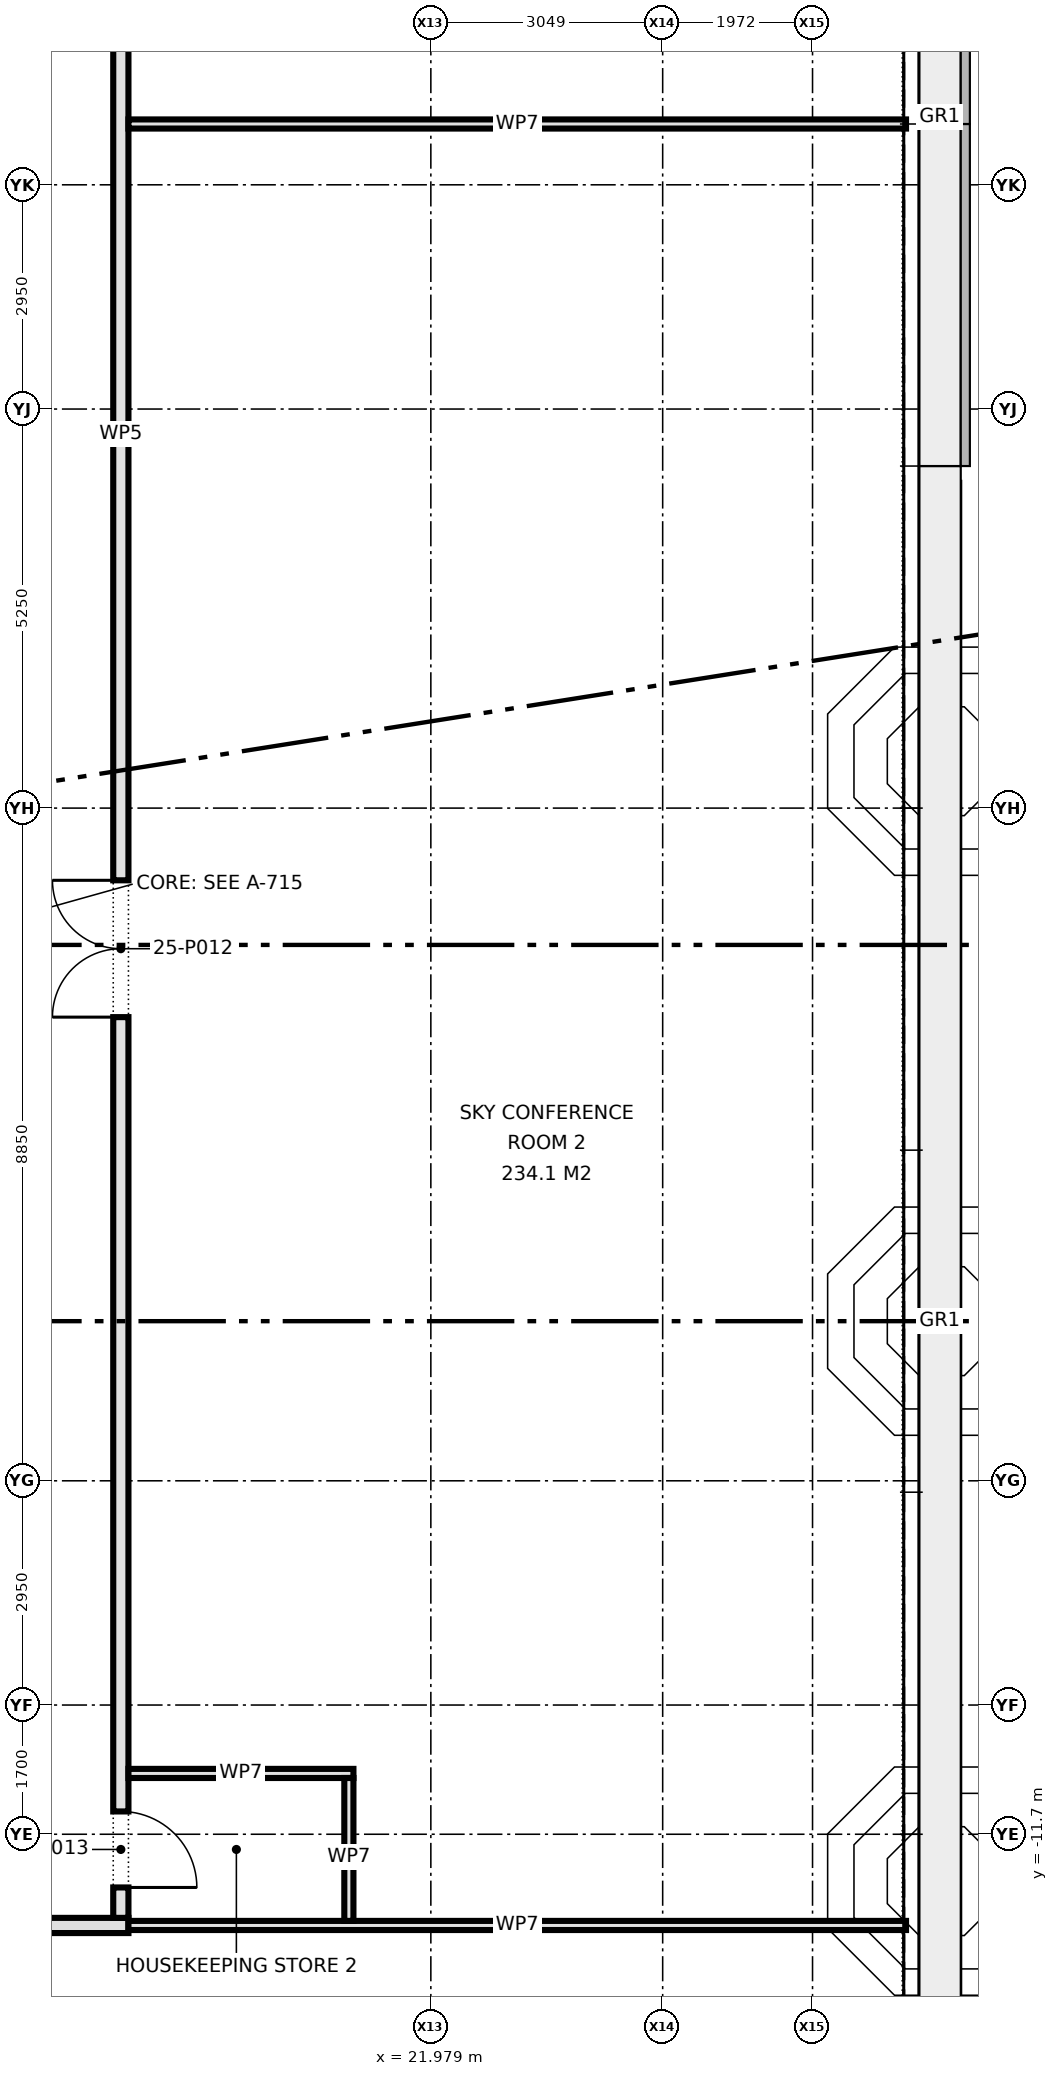
"""IFC4 building model, lengths in metres.
Left out: names, types, materials, properties, quantities, classifications, styles, units other than length and angle.
Written with IfcOpenShell. Run it as: python <this file> out.ifc"""

import sys

from ifc_helpers import new_model, si_unit, direction, frame, frame_2d, origin, place, context, subcontext, project, spatial, rectangle, extrude, element, fill, save


model = new_model("IFC4")
c1 = context("Model", 3, precision=1e-05, world=origin(), true_north=direction((0.0, 1.0)))
c2 = subcontext(c1, "Body", "Model", "MODEL_VIEW")
j1 = project(units=[si_unit("LENGTHUNIT", "METRE"), si_unit("PLANEANGLEUNIT", "RADIAN")], contexts=[c1])
p1 = place(None, origin())
s1 = spatial("IfcSite", under=j1, at=p1, CompositionType="ELEMENT")
p2 = place(p1, origin())
s2 = spatial("IfcBuilding", under=s1, at=p2, CompositionType="ELEMENT")
p3 = place(p2, frame((0.0, 0.0, 112.8)))
s3 = spatial("IfcBuildingStorey", under=s2, at=p3, CompositionType="ELEMENT", Elevation=112.8)
p4 = place(p3, frame((-20.33, -12.9, 0.0), z_axis=(0.0, 0.0, 1.0), x_axis=(1.0, 0.0, 0.0)))
e1 = element("IfcWall", 1, at=p4, inside=s3, PredefinedType="PARTITIONING", context=c2, shape_type="SweptSolid", body=[
    extrude(rectangle(XDim=38.33, YDim=0.2, at=frame_2d((19.165, 0.0))), origin(), (0.0, 0.0, 1.0), 7.35),
])
p5 = place(p4, frame((7.89, 0.0, 0.0)))
e2 = element("IfcOpeningElement", 2, at=p5, cuts=e1, PredefinedType="OPENING", context=c2, shape_type="SweptSolid", body=[
    extrude(rectangle(XDim=1.8, YDim=2.1, at=frame_2d((0.9, 1.05))), frame((0.0, 0.11, 0.0), z_axis=(0.0, -1.0, 0.0), x_axis=(1.0, 0.0, 0.0)), (0.0, 0.0, 1.0), 0.22),
])
p6 = place(p4, frame((32.985, 0.0, 0.0)))
e3 = element("IfcOpeningElement", 3, at=p6, cuts=e1, PredefinedType="OPENING", context=c2, shape_type="SweptSolid", body=[
    extrude(rectangle(XDim=1.8, YDim=2.1, at=frame_2d((0.9, 1.05))), frame((0.0, 0.11, 0.0), z_axis=(0.0, -1.0, 0.0), x_axis=(1.0, 0.0, 0.0)), (0.0, 0.0, 1.0), 0.22),
])
p7 = place(p4, frame((18.83, 0.0, 0.0)))
e4 = element("IfcOpeningElement", 4, at=p7, cuts=e1, PredefinedType="OPENING", context=c2, shape_type="SweptSolid", body=[
    extrude(rectangle(XDim=1.2, YDim=2.1, at=frame_2d((0.6, 1.05))), frame((0.0, 0.11, 0.0), z_axis=(0.0, -1.0, 0.0), x_axis=(1.0, 0.0, 0.0)), (0.0, 0.0, 1.0), 0.22),
])
p8 = place(p4, frame((22.33, 0.0, 0.0)))
e5 = element("IfcOpeningElement", 5, at=p8, cuts=e1, PredefinedType="OPENING", context=c2, shape_type="SweptSolid", body=[
    extrude(rectangle(XDim=1.0, YDim=2.1, at=frame_2d((0.5, 1.05))), frame((0.0, 0.11, 0.0), z_axis=(0.0, -1.0, 0.0), x_axis=(1.0, 0.0, 0.0)), (0.0, 0.0, 1.0), 0.22),
])
p9 = place(p4, frame((25.33, 0.0, 0.0)))
e6 = element("IfcOpeningElement", 6, at=p9, cuts=e1, PredefinedType="OPENING", context=c2, shape_type="SweptSolid", body=[
    extrude(rectangle(XDim=1.0, YDim=2.1, at=frame_2d((0.5, 1.05))), frame((0.0, 0.11, 0.0), z_axis=(0.0, -1.0, 0.0), x_axis=(1.0, 0.0, 0.0)), (0.0, 0.0, 1.0), 0.22),
])
p10 = place(p4, frame((27.93, 0.0, 0.0)))
e7 = element("IfcOpeningElement", 7, at=p10, cuts=e1, PredefinedType="OPENING", context=c2, shape_type="SweptSolid", body=[
    extrude(rectangle(XDim=1.0, YDim=2.1, at=frame_2d((0.5, 1.05))), frame((0.0, 0.11, 0.0), z_axis=(0.0, -1.0, 0.0), x_axis=(1.0, 0.0, 0.0)), (0.0, 0.0, 1.0), 0.22),
])
p11 = place(p3, frame((17.9, -12.8, 0.0), z_axis=(0.0, 0.0, 1.0), x_axis=(0.0, 1.0, 0.0)))
e8 = element("IfcWall", 8, at=p11, inside=s3, PredefinedType="PARTITIONING", context=c2, shape_type="SweptSolid", body=[
    extrude(rectangle(XDim=25.6, YDim=0.2, at=frame_2d((12.8, 0.0))), origin(), (0.0, 0.0, 1.0), 7.35),
])
p12 = place(p11, frame((11.85, 0.0, 0.0)))
e9 = element("IfcOpeningElement", 9, at=p12, cuts=e8, PredefinedType="OPENING", context=c2, shape_type="SweptSolid", body=[
    extrude(rectangle(XDim=1.8, YDim=2.1, at=frame_2d((0.9, 1.05))), frame((0.0, 0.11, 0.0), z_axis=(0.0, -1.0, 0.0), x_axis=(1.0, 0.0, 0.0)), (0.0, 0.0, 1.0), 0.22),
])
p13 = place(p11, frame((0.4, 0.0, 0.0)))
e10 = element("IfcOpeningElement", 10, at=p13, cuts=e8, PredefinedType="OPENING", context=c2, shape_type="SweptSolid", body=[
    extrude(rectangle(XDim=1.0, YDim=2.1, at=frame_2d((0.5, 1.05))), frame((0.0, 0.11, 0.0), z_axis=(0.0, -1.0, 0.0), x_axis=(1.0, 0.0, 0.0)), (0.0, 0.0, 1.0), 0.22),
])
p14 = place(p3, frame((18.0, -12.9, 0.0), z_axis=(0.0, 0.0, 1.0), x_axis=(1.0, 0.0, 0.0)))
e11 = element("IfcWall", 11, at=p14, inside=s3, PredefinedType="PARTITIONING", context=c2, shape_type="SweptSolid", body=[
    extrude(rectangle(XDim=10.23, YDim=0.12, at=frame_2d((5.115, 0.0))), origin(), (0.0, 0.0, 1.0), 7.35),
])
p15 = place(p3, frame((18.0, -10.9, 0.0), z_axis=(0.0, 0.0, 1.0), x_axis=(1.0, 0.0, 0.0)))
e12 = element("IfcWall", 12, at=p15, inside=s3, PredefinedType="PARTITIONING", context=c2, shape_type="SweptSolid", body=[
    extrude(rectangle(XDim=2.96, YDim=0.12, at=frame_2d((1.48, 0.0))), origin(), (0.0, 0.0, 1.0), 7.35),
])
p16 = place(p3, frame((18.0, 10.8, 0.0), z_axis=(0.0, 0.0, 1.0), x_axis=(1.0, 0.0, 0.0)))
e13 = element("IfcWall", 13, at=p16, inside=s3, PredefinedType="PARTITIONING", context=c2, shape_type="SweptSolid", body=[
    extrude(rectangle(XDim=10.23, YDim=0.12, at=frame_2d((5.115, 0.0))), origin(), (0.0, 0.0, 1.0), 7.35),
])
p17 = place(p3, frame((20.9, -12.84, 0.0), z_axis=(0.0, 0.0, 1.0), x_axis=(0.0, 1.0, 0.0)))
e14 = element("IfcWall", 14, at=p17, inside=s3, PredefinedType="PARTITIONING", context=c2, shape_type="SweptSolid", body=[
    extrude(rectangle(XDim=1.88, YDim=0.12, at=frame_2d((0.94, 0.0))), origin(), (0.0, 0.0, 1.0), 7.35),
])
p18 = place(p12, origin())
e15 = element("IfcDoor", 15, at=p18, inside=s3, OperationType="DOUBLE_DOOR_SINGLE_SWING", PredefinedType="DOOR", context=c2, shape_type="SweptSolid", body=[
    extrude(rectangle(XDim=1.8, YDim=2.1, at=frame_2d((0.9, 1.05))), frame((0.0, 0.025, 0.0), z_axis=(0.0, -1.0, 0.0), x_axis=(1.0, 0.0, 0.0)), (0.0, 0.0, 1.0), 0.05),
])
fill(e9, e15)
p19 = place(p13, frame((1.0, 0.0, 0.0), z_axis=(0.0, 0.0, 1.0), x_axis=(-1.0, 0.0, 0.0)))
e16 = element("IfcDoor", 16, at=p19, inside=s3, OperationType="SINGLE_SWING_RIGHT", PredefinedType="DOOR", context=c2, shape_type="SweptSolid", body=[
    extrude(rectangle(XDim=1.0, YDim=2.1, at=frame_2d((0.5, 1.05))), frame((0.0, 0.025, 0.0), z_axis=(0.0, -1.0, 0.0), x_axis=(1.0, 0.0, 0.0)), (0.0, 0.0, 1.0), 0.05),
])
fill(e10, e16)
save(model, sys.argv[1])
